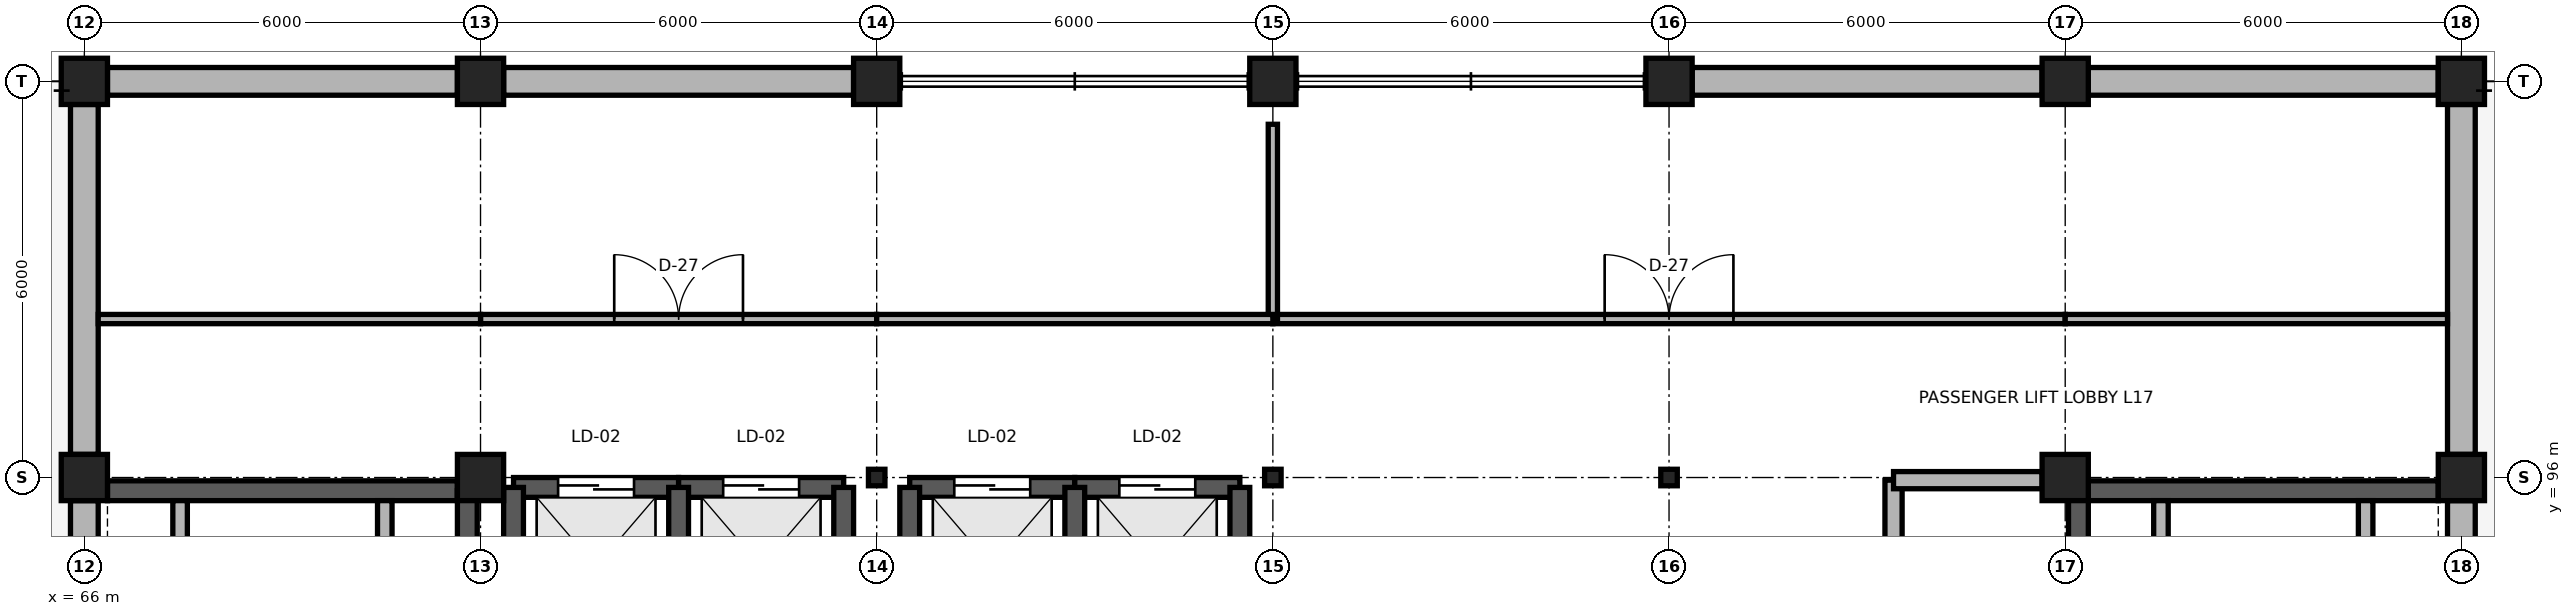
"""IFC4 building model, lengths in metres.
Left out: names, types, materials, properties, quantities, classifications, styles, units other than length and angle.
Written with IfcOpenShell. Run it as: python <this file> out.ifc"""

import sys

from ifc_helpers import new_model, si_unit, direction, frame, frame_2d, origin, origin_2d, place, context, subcontext, project, spatial, rectangle, i_section, extrude, element, fill, save


model = new_model("IFC4")
c1 = context("Model", 3, precision=1e-05, world=origin(), true_north=direction((0.0, 1.0)))
c2 = subcontext(c1, "Body", "Model", "MODEL_VIEW")
j1 = project(units=[si_unit("LENGTHUNIT", "METRE"), si_unit("PLANEANGLEUNIT", "RADIAN")], contexts=[c1])
p1 = place(None, origin())
s1 = spatial("IfcSite", under=j1, at=p1, CompositionType="ELEMENT")
p2 = place(p1, origin())
s2 = spatial("IfcBuilding", under=s1, at=p2, CompositionType="ELEMENT")
p3 = place(p2, frame((0.0, 0.0, 67.8)))
s3 = spatial("IfcBuildingStorey", under=s2, at=p3, CompositionType="ELEMENT", Elevation=67.8)
for number, where, z_axis, x_axis in (
    (1, (66.0, 96.0, 0.0), (0.0, 0.0, 1.0), (1.0, 0.0, 0.0)),
    (2, (72.0, 96.0, 0.0), (0.0, 0.0, 1.0), (1.0, 0.0, 0.0)),
):
    element("IfcColumn", number, at=place(p3, frame(where, z_axis=z_axis, x_axis=x_axis)), inside=s3, PredefinedType="COLUMN", context=c2, shape_type="SweptSolid", body=[
        extrude(rectangle(XDim=0.7, YDim=0.7, at=origin_2d()), origin(), (0.0, 0.0, 1.0), 4.2),
    ])
for number, where, z_axis, x_axis in (
    (3, (78.0, 96.0, 0.0), (0.0, 0.0, 1.0), (1.0, 0.0, 0.0)),
    (4, (84.0, 96.0, 0.0), (0.0, 0.0, 1.0), (1.0, 0.0, 0.0)),
    (5, (90.0, 96.0, 0.0), (0.0, 0.0, 1.0), (1.0, 0.0, 0.0)),
):
    element("IfcColumn", number, at=place(p3, frame(where, z_axis=z_axis, x_axis=x_axis)), inside=s3, PredefinedType="COLUMN", context=c2, shape_type="SweptSolid", body=[
        extrude(i_section(OverallWidth=0.25, OverallDepth=0.25, WebThickness=0.009, FlangeThickness=0.014, FilletRadius=0.016, at=origin_2d()), origin(), (0.0, 0.0, 1.0), 4.2),
    ])
for number, where, z_axis, x_axis in (
    (6, (96.0, 96.0, 0.0), (0.0, 0.0, 1.0), (1.0, 0.0, 0.0)),
    (7, (102.0, 96.0, 0.0), (0.0, 0.0, 1.0), (1.0, 0.0, 0.0)),
    (8, (66.0, 102.0, 0.0), (0.0, 0.0, 1.0), (1.0, 0.0, 0.0)),
    (9, (72.0, 102.0, 0.0), (0.0, 0.0, 1.0), (1.0, 0.0, 0.0)),
    (10, (78.0, 102.0, 0.0), (0.0, 0.0, 1.0), (1.0, 0.0, 0.0)),
    (11, (84.0, 102.0, 0.0), (0.0, 0.0, 1.0), (1.0, 0.0, 0.0)),
    (12, (90.0, 102.0, 0.0), (0.0, 0.0, 1.0), (1.0, 0.0, 0.0)),
    (13, (96.0, 102.0, 0.0), (0.0, 0.0, 1.0), (1.0, 0.0, 0.0)),
    (14, (102.0, 102.0, 0.0), (0.0, 0.0, 1.0), (1.0, 0.0, 0.0)),
):
    element("IfcColumn", number, at=place(p3, frame(where, z_axis=z_axis, x_axis=x_axis)), inside=s3, PredefinedType="COLUMN", context=c2, shape_type="SweptSolid", body=[
        extrude(rectangle(XDim=0.7, YDim=0.7, at=origin_2d()), origin(), (0.0, 0.0, 1.0), 4.2),
    ])
for number, where, z_axis, x_axis in (
    (15, (66.35, 102.0, 0.0), (0.0, 0.0, 1.0), (1.0, 0.0, 0.0)),
    (16, (72.35, 102.0, 0.0), (0.0, 0.0, 1.0), (1.0, 0.0, 0.0)),
    (17, (90.35, 102.0, 0.0), (0.0, 0.0, 1.0), (1.0, 0.0, 0.0)),
    (18, (96.35, 102.0, 0.0), (0.0, 0.0, 1.0), (1.0, 0.0, 0.0)),
    (19, (66.0, 90.35, 0.0), (0.0, 0.0, 1.0), (0.0, 1.0, 0.0)),
    (20, (66.0, 96.35, 0.0), (0.0, 0.0, 1.0), (0.0, 1.0, 0.0)),
    (21, (102.0, 90.35, 0.0), (0.0, 0.0, 1.0), (0.0, 1.0, 0.0)),
    (22, (102.0, 96.35, 0.0), (0.0, 0.0, 1.0), (0.0, 1.0, 0.0)),
):
    element("IfcWall", number, at=place(p3, frame(where, z_axis=z_axis, x_axis=x_axis)), inside=s3, PredefinedType="SOLIDWALL", context=c2, shape_type="SweptSolid", body=[
        extrude(rectangle(XDim=5.3, YDim=0.42, at=frame_2d((2.65, 0.0))), origin(), (0.0, 0.0, 1.0), 3.54),
    ])
p4 = place(p3, frame((66.35, 95.8, 0.0), z_axis=(0.0, 0.0, 1.0), x_axis=(1.0, 0.0, 0.0)))
e23 = element("IfcWall", 23, at=p4, inside=s3, PredefinedType="SHEAR", context=c2, shape_type="SweptSolid", body=[
    extrude(rectangle(XDim=5.3, YDim=0.3, at=frame_2d((2.65, 0.0))), origin(), (0.0, 0.0, 1.0), 3.96),
])
p5 = place(p3, frame((71.8, 84.0, 0.0), z_axis=(0.0, 0.0, 1.0), x_axis=(0.0, 1.0, 0.0)))
e24 = element("IfcWall", 24, at=p5, inside=s3, PredefinedType="SHEAR", context=c2, shape_type="SweptSolid", body=[
    extrude(rectangle(XDim=11.8, YDim=0.3, at=frame_2d((5.9, 0.0))), origin(), (0.0, 0.0, 1.0), 3.96),
])
for number, where, z_axis, x_axis in (
    (25, (67.45, 94.4, 0.0), (0.0, 0.0, 1.0), (0.0, 1.0, 0.0)),
    (26, (70.55, 94.4, 0.0), (0.0, 0.0, 1.0), (0.0, 1.0, 0.0)),
):
    element("IfcWall", number, at=place(p3, frame(where, z_axis=z_axis, x_axis=x_axis)), inside=s3, PredefinedType="PARTITIONING", context=c2, shape_type="SweptSolid", body=[
        extrude(rectangle(XDim=1.25, YDim=0.22, at=frame_2d((0.625, 0.0))), origin(), (0.0, 0.0, 1.0), 3.96),
    ])
p6 = place(p3, frame((96.35, 95.8, 0.0), z_axis=(0.0, 0.0, 1.0), x_axis=(1.0, 0.0, 0.0)))
e27 = element("IfcWall", 27, at=p6, inside=s3, PredefinedType="SHEAR", context=c2, shape_type="SweptSolid", body=[
    extrude(rectangle(XDim=5.3, YDim=0.3, at=frame_2d((2.65, 0.0))), origin(), (0.0, 0.0, 1.0), 3.96),
])
p7 = place(p3, frame((96.2, 84.0, 0.0), z_axis=(0.0, 0.0, 1.0), x_axis=(0.0, 1.0, 0.0)))
e28 = element("IfcWall", 28, at=p7, inside=s3, PredefinedType="SHEAR", context=c2, shape_type="SweptSolid", body=[
    extrude(rectangle(XDim=11.8, YDim=0.3, at=frame_2d((5.9, 0.0))), origin(), (0.0, 0.0, 1.0), 3.96),
])
for number, where, z_axis, x_axis in (
    (29, (97.45, 94.4, 0.0), (0.0, 0.0, 1.0), (0.0, 1.0, 0.0)),
    (30, (100.55, 94.4, 0.0), (0.0, 0.0, 1.0), (0.0, 1.0, 0.0)),
):
    element("IfcWall", number, at=place(p3, frame(where, z_axis=z_axis, x_axis=x_axis)), inside=s3, PredefinedType="PARTITIONING", context=c2, shape_type="SweptSolid", body=[
        extrude(rectangle(XDim=1.25, YDim=0.22, at=frame_2d((0.625, 0.0))), origin(), (0.0, 0.0, 1.0), 3.96),
    ])
p8 = place(p3, frame((72.5, 95.85, 0.0), z_axis=(0.0, 0.0, 1.0), x_axis=(1.0, 0.0, 0.0)))
e31 = element("IfcWall", 31, at=p8, inside=s3, PredefinedType="SHEAR", context=c2, shape_type="SweptSolid", body=[
    extrude(rectangle(XDim=2.5, YDim=0.3, at=frame_2d((1.25, 0.0))), origin(), (0.0, 0.0, 1.0), 3.96),
])
p9 = place(p8, frame((0.675, 0.0, 0.0)))
e32 = element("IfcOpeningElement", 32, at=p9, cuts=e31, PredefinedType="OPENING", context=c2, shape_type="SweptSolid", body=[
    extrude(rectangle(XDim=1.15, YDim=2.15, at=frame_2d((0.575, 1.075))), frame((0.0, 0.165, 0.0), z_axis=(0.0, -1.0, 0.0), x_axis=(1.0, 0.0, 0.0)), (0.0, 0.0, 1.0), 0.33),
])
p10 = place(p3, frame((72.5, 92.45, 0.0), z_axis=(0.0, 0.0, 1.0), x_axis=(0.0, 1.0, 0.0)))
e33 = element("IfcWall", 33, at=p10, inside=s3, PredefinedType="SHEAR", context=c2, shape_type="SweptSolid", body=[
    extrude(rectangle(XDim=3.4, YDim=0.3, at=frame_2d((1.7, 0.0))), origin(), (0.0, 0.0, 1.0), 3.96),
])
p11 = place(p3, frame((75.0, 95.85, 0.0), z_axis=(0.0, 0.0, 1.0), x_axis=(1.0, 0.0, 0.0)))
e34 = element("IfcWall", 34, at=p11, inside=s3, PredefinedType="SHEAR", context=c2, shape_type="SweptSolid", body=[
    extrude(rectangle(XDim=2.5, YDim=0.3, at=frame_2d((1.25, 0.0))), origin(), (0.0, 0.0, 1.0), 3.96),
])
p12 = place(p11, frame((0.675, 0.0, 0.0)))
e35 = element("IfcOpeningElement", 35, at=p12, cuts=e34, PredefinedType="OPENING", context=c2, shape_type="SweptSolid", body=[
    extrude(rectangle(XDim=1.15, YDim=2.15, at=frame_2d((0.575, 1.075))), frame((0.0, 0.165, 0.0), z_axis=(0.0, -1.0, 0.0), x_axis=(1.0, 0.0, 0.0)), (0.0, 0.0, 1.0), 0.33),
])
for number, where, z_axis, x_axis in (
    (36, (75.0, 92.45, 0.0), (0.0, 0.0, 1.0), (0.0, 1.0, 0.0)),
    (37, (77.5, 92.45, 0.0), (0.0, 0.0, 1.0), (0.0, 1.0, 0.0)),
):
    element("IfcWall", number, at=place(p3, frame(where, z_axis=z_axis, x_axis=x_axis)), inside=s3, PredefinedType="SHEAR", context=c2, shape_type="SweptSolid", body=[
        extrude(rectangle(XDim=3.4, YDim=0.3, at=frame_2d((1.7, 0.0))), origin(), (0.0, 0.0, 1.0), 3.96),
    ])
p13 = place(p3, frame((78.5, 95.85, 0.0), z_axis=(0.0, 0.0, 1.0), x_axis=(1.0, 0.0, 0.0)))
e38 = element("IfcWall", 38, at=p13, inside=s3, PredefinedType="SHEAR", context=c2, shape_type="SweptSolid", body=[
    extrude(rectangle(XDim=2.5, YDim=0.3, at=frame_2d((1.25, 0.0))), origin(), (0.0, 0.0, 1.0), 3.96),
])
p14 = place(p13, frame((0.675, 0.0, 0.0)))
e39 = element("IfcOpeningElement", 39, at=p14, cuts=e38, PredefinedType="OPENING", context=c2, shape_type="SweptSolid", body=[
    extrude(rectangle(XDim=1.15, YDim=2.15, at=frame_2d((0.575, 1.075))), frame((0.0, 0.165, 0.0), z_axis=(0.0, -1.0, 0.0), x_axis=(1.0, 0.0, 0.0)), (0.0, 0.0, 1.0), 0.33),
])
p15 = place(p3, frame((78.5, 92.45, 0.0), z_axis=(0.0, 0.0, 1.0), x_axis=(0.0, 1.0, 0.0)))
e40 = element("IfcWall", 40, at=p15, inside=s3, PredefinedType="SHEAR", context=c2, shape_type="SweptSolid", body=[
    extrude(rectangle(XDim=3.4, YDim=0.3, at=frame_2d((1.7, 0.0))), origin(), (0.0, 0.0, 1.0), 3.96),
])
p16 = place(p3, frame((81.0, 95.85, 0.0), z_axis=(0.0, 0.0, 1.0), x_axis=(1.0, 0.0, 0.0)))
e41 = element("IfcWall", 41, at=p16, inside=s3, PredefinedType="SHEAR", context=c2, shape_type="SweptSolid", body=[
    extrude(rectangle(XDim=2.5, YDim=0.3, at=frame_2d((1.25, 0.0))), origin(), (0.0, 0.0, 1.0), 3.96),
])
p17 = place(p16, frame((0.675, 0.0, 0.0)))
e42 = element("IfcOpeningElement", 42, at=p17, cuts=e41, PredefinedType="OPENING", context=c2, shape_type="SweptSolid", body=[
    extrude(rectangle(XDim=1.15, YDim=2.15, at=frame_2d((0.575, 1.075))), frame((0.0, 0.165, 0.0), z_axis=(0.0, -1.0, 0.0), x_axis=(1.0, 0.0, 0.0)), (0.0, 0.0, 1.0), 0.33),
])
for number, where, z_axis, x_axis in (
    (43, (81.0, 92.45, 0.0), (0.0, 0.0, 1.0), (0.0, 1.0, 0.0)),
    (44, (83.5, 92.45, 0.0), (0.0, 0.0, 1.0), (0.0, 1.0, 0.0)),
):
    element("IfcWall", number, at=place(p3, frame(where, z_axis=z_axis, x_axis=x_axis)), inside=s3, PredefinedType="SHEAR", context=c2, shape_type="SweptSolid", body=[
        extrude(rectangle(XDim=3.4, YDim=0.3, at=frame_2d((1.7, 0.0))), origin(), (0.0, 0.0, 1.0), 3.96),
    ])
p18 = place(p3, frame((93.4, 84.0, 0.0), z_axis=(0.0, 0.0, 1.0), x_axis=(0.0, 1.0, 0.0)))
e45 = element("IfcWall", 45, at=p18, inside=s3, PredefinedType="PARTITIONING", context=c2, shape_type="SweptSolid", body=[
    extrude(rectangle(XDim=11.96, YDim=0.26, at=frame_2d((5.98, 0.0))), origin(), (0.0, 0.0, 1.0), 3.96),
])
p19 = place(p18, frame((3.425, 0.0, 0.0)))
e46 = element("IfcOpeningElement", 46, at=p19, cuts=e45, PredefinedType="OPENING", context=c2, shape_type="SweptSolid", body=[
    extrude(rectangle(XDim=1.15, YDim=2.2, at=frame_2d((0.575, 1.1))), frame((0.0, 0.145, 0.0), z_axis=(0.0, -1.0, 0.0), x_axis=(1.0, 0.0, 0.0)), (0.0, 0.0, 1.0), 0.29),
])
p20 = place(p3, frame((93.4, 95.96, 0.0), z_axis=(0.0, 0.0, 1.0), x_axis=(1.0, 0.0, 0.0)))
e47 = element("IfcWall", 47, at=p20, inside=s3, PredefinedType="PARTITIONING", context=c2, shape_type="SweptSolid", body=[
    extrude(rectangle(XDim=2.25, YDim=0.26, at=frame_2d((1.125, 0.0))), origin(), (0.0, 0.0, 1.0), 3.716),
])
p21 = place(p3, frame((72.0, 98.4, 0.0), z_axis=(0.0, 0.0, 1.0), x_axis=(1.0, 0.0, 0.0)))
e48 = element("IfcWall", 48, at=p21, inside=s3, PredefinedType="PARTITIONING", context=c2, shape_type="SweptSolid", body=[
    extrude(rectangle(XDim=6.0, YDim=0.14, at=frame_2d((3.0, 0.0))), origin(), (0.0, 0.0, 1.0), 3.96),
])
p22 = place(p21, frame((2.025, 0.0, 0.0)))
e49 = element("IfcOpeningElement", 49, at=p22, cuts=e48, PredefinedType="OPENING", context=c2, shape_type="SweptSolid", body=[
    extrude(rectangle(XDim=1.95, YDim=2.8, at=frame_2d((0.975, 1.4))), frame((0.0, 0.085, 0.0), z_axis=(0.0, -1.0, 0.0), x_axis=(1.0, 0.0, 0.0)), (0.0, 0.0, 1.0), 0.17),
])
p23 = place(p3, frame((84.0, 98.4, 0.0), z_axis=(0.0, 0.0, 1.0), x_axis=(1.0, 0.0, 0.0)))
e50 = element("IfcWall", 50, at=p23, inside=s3, PredefinedType="PARTITIONING", context=c2, shape_type="SweptSolid", body=[
    extrude(rectangle(XDim=12.0, YDim=0.14, at=frame_2d((6.0, 0.0))), origin(), (0.0, 0.0, 1.0), 3.96),
])
p24 = place(p23, frame((5.025, 0.0, 0.0)))
e51 = element("IfcOpeningElement", 51, at=p24, cuts=e50, PredefinedType="OPENING", context=c2, shape_type="SweptSolid", body=[
    extrude(rectangle(XDim=1.95, YDim=2.8, at=frame_2d((0.975, 1.4))), frame((0.0, 0.085, 0.0), z_axis=(0.0, -1.0, 0.0), x_axis=(1.0, 0.0, 0.0)), (0.0, 0.0, 1.0), 0.17),
])
p25 = place(p3, frame((84.0, 98.4, 0.0), z_axis=(0.0, 0.0, 1.0), x_axis=(0.0, 1.0, 0.0)))
e52 = element("IfcWall", 52, at=p25, inside=s3, PredefinedType="PARTITIONING", context=c2, shape_type="SweptSolid", body=[
    extrude(rectangle(XDim=2.95, YDim=0.14, at=frame_2d((1.475, 0.0))), origin(), (0.0, 0.0, 1.0), 3.716),
])
p26 = place(p3, frame((66.21, 98.4, 0.0), z_axis=(0.0, 0.0, 1.0), x_axis=(1.0, 0.0, 0.0)))
e53 = element("IfcWall", 53, at=p26, inside=s3, PredefinedType="PARTITIONING", context=c2, shape_type="SweptSolid", body=[
    extrude(rectangle(XDim=5.79, YDim=0.14, at=frame_2d((2.895, 0.0))), origin(), (0.0, 0.0, 1.0), 3.96),
])
p27 = place(p3, frame((78.0, 98.4, 0.0), z_axis=(0.0, 0.0, 1.0), x_axis=(1.0, 0.0, 0.0)))
e54 = element("IfcWall", 54, at=p27, inside=s3, PredefinedType="PARTITIONING", context=c2, shape_type="SweptSolid", body=[
    extrude(rectangle(XDim=6.0, YDim=0.14, at=frame_2d((3.0, 0.0))), origin(), (0.0, 0.0, 1.0), 3.96),
])
p28 = place(p3, frame((96.0, 98.4, 0.0), z_axis=(0.0, 0.0, 1.0), x_axis=(1.0, 0.0, 0.0)))
e55 = element("IfcWall", 55, at=p28, inside=s3, PredefinedType="PARTITIONING", context=c2, shape_type="SweptSolid", body=[
    extrude(rectangle(XDim=5.79, YDim=0.14, at=frame_2d((2.895, 0.0))), origin(), (0.0, 0.0, 1.0), 3.96),
])
p29 = place(p9, origin())
e56 = element("IfcDoor", 56, at=p29, inside=s3, OperationType="DOUBLE_DOOR_SLIDING", PredefinedType="DOOR", context=c2, shape_type="SweptSolid", body=[
    extrude(rectangle(XDim=1.15, YDim=2.15, at=frame_2d((0.575, 1.075))), frame((0.0, 0.025, 0.0), z_axis=(0.0, -1.0, 0.0), x_axis=(1.0, 0.0, 0.0)), (0.0, 0.0, 1.0), 0.05),
])
fill(e32, e56)
p30 = place(p12, origin())
e57 = element("IfcDoor", 57, at=p30, inside=s3, OperationType="DOUBLE_DOOR_SLIDING", PredefinedType="DOOR", context=c2, shape_type="SweptSolid", body=[
    extrude(rectangle(XDim=1.15, YDim=2.15, at=frame_2d((0.575, 1.075))), frame((0.0, 0.025, 0.0), z_axis=(0.0, -1.0, 0.0), x_axis=(1.0, 0.0, 0.0)), (0.0, 0.0, 1.0), 0.05),
])
fill(e35, e57)
p31 = place(p14, origin())
e58 = element("IfcDoor", 58, at=p31, inside=s3, OperationType="DOUBLE_DOOR_SLIDING", PredefinedType="DOOR", context=c2, shape_type="SweptSolid", body=[
    extrude(rectangle(XDim=1.15, YDim=2.15, at=frame_2d((0.575, 1.075))), frame((0.0, 0.025, 0.0), z_axis=(0.0, -1.0, 0.0), x_axis=(1.0, 0.0, 0.0)), (0.0, 0.0, 1.0), 0.05),
])
fill(e39, e58)
p32 = place(p17, origin())
e59 = element("IfcDoor", 59, at=p32, inside=s3, OperationType="DOUBLE_DOOR_SLIDING", PredefinedType="DOOR", context=c2, shape_type="SweptSolid", body=[
    extrude(rectangle(XDim=1.15, YDim=2.15, at=frame_2d((0.575, 1.075))), frame((0.0, 0.025, 0.0), z_axis=(0.0, -1.0, 0.0), x_axis=(1.0, 0.0, 0.0)), (0.0, 0.0, 1.0), 0.05),
])
fill(e42, e59)
p33 = place(p22, origin())
e60 = element("IfcDoor", 60, at=p33, inside=s3, OperationType="DOUBLE_DOOR_SINGLE_SWING", PredefinedType="DOOR", context=c2, shape_type="SweptSolid", body=[
    extrude(rectangle(XDim=1.95, YDim=2.8, at=frame_2d((0.975, 1.4))), frame((0.0, 0.025, 0.0), z_axis=(0.0, -1.0, 0.0), x_axis=(1.0, 0.0, 0.0)), (0.0, 0.0, 1.0), 0.05),
])
fill(e49, e60)
p34 = place(p24, origin())
e61 = element("IfcDoor", 61, at=p34, inside=s3, OperationType="DOUBLE_DOOR_SINGLE_SWING", PredefinedType="DOOR", context=c2, shape_type="SweptSolid", body=[
    extrude(rectangle(XDim=1.95, YDim=2.8, at=frame_2d((0.975, 1.4))), frame((0.0, 0.025, 0.0), z_axis=(0.0, -1.0, 0.0), x_axis=(1.0, 0.0, 0.0)), (0.0, 0.0, 1.0), 0.05),
])
fill(e51, e61)
save(model, sys.argv[1])
